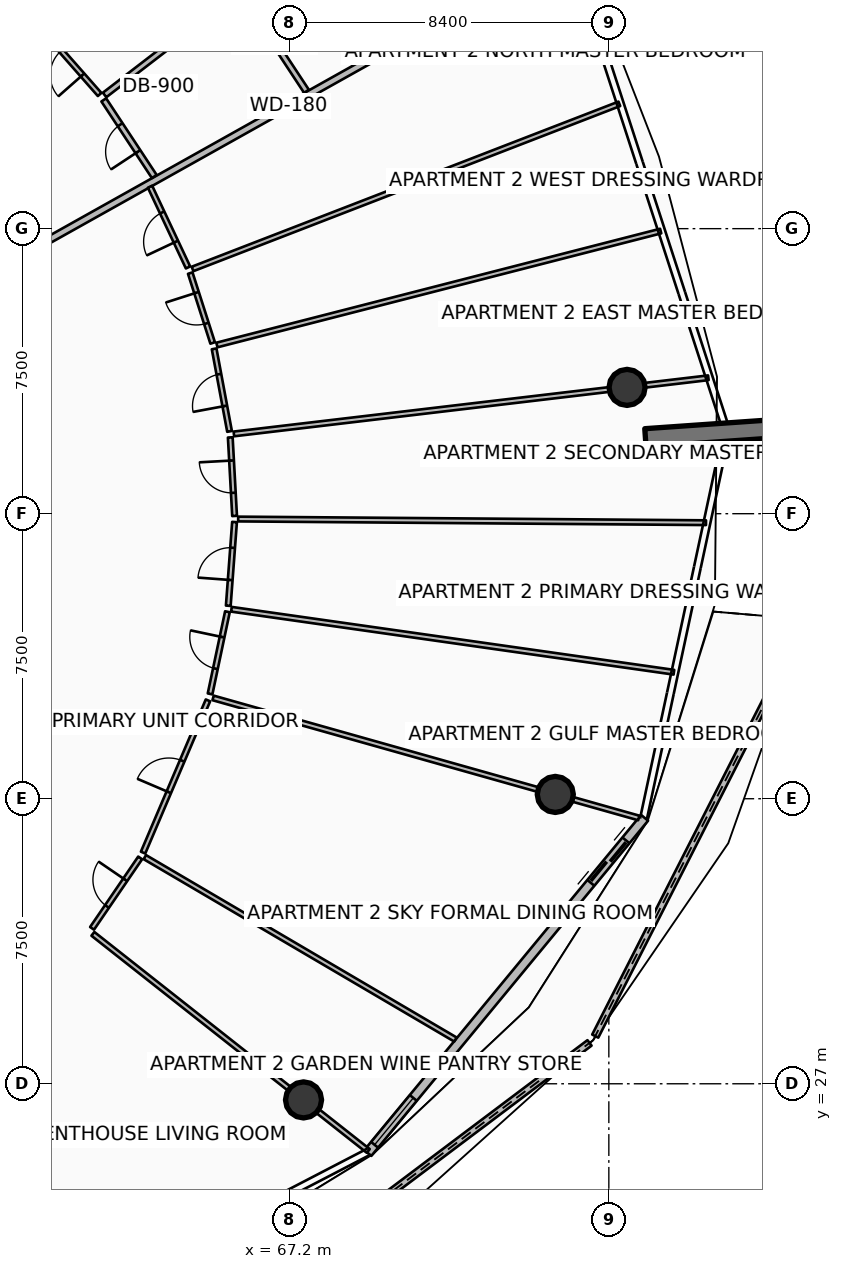
"""IFC4 building model, lengths in metres.
Left out: names, types, materials, properties, quantities, classifications, styles, units other than length and angle.
Written with IfcOpenShell. Run it as: python <this file> out.ifc"""

import sys

from ifc_helpers import new_model, si_unit, direction, frame, frame_2d, origin, origin_2d, place, context, subcontext, project, spatial, polyline, rectangle, circle, outline, extrude, element, fill, save


model = new_model("IFC4")
c1 = context("Model", 3, precision=1e-05, world=origin(), true_north=direction((0.0, 1.0)))
c2 = subcontext(c1, "Body", "Model", "MODEL_VIEW")
j1 = project(units=[si_unit("LENGTHUNIT", "METRE"), si_unit("PLANEANGLEUNIT", "RADIAN")], contexts=[c1])
p1 = place(None, origin())
s1 = spatial("IfcSite", under=j1, at=p1, CompositionType="ELEMENT")
p2 = place(p1, origin())
s2 = spatial("IfcBuilding", under=s1, at=p2, CompositionType="ELEMENT")
p3 = place(p2, frame((0.0, 0.0, 240.55)))
s3 = spatial("IfcBuildingStorey", under=s2, at=p3, CompositionType="ELEMENT", Elevation=240.55)
p4 = place(p3, frame((76.562, 43.997, 0.0), z_axis=(0.0, 0.0, 1.0), x_axis=(0.997563824095, 0.069759707979, 0.0)))
e1 = element("IfcWall", 1, at=p4, inside=s3, PredefinedType="SOLIDWALL", context=c2, shape_type="SweptSolid", body=[
    extrude(rectangle(XDim=3.5, YDim=0.48, at=frame_2d((1.75, 0.0))), origin(), (0.0, 0.0, 1.0), 3.85),
])
for number, where, z_axis, x_axis in (
    (2, (67.566, 26.575, 0.0), (0.0, 0.0, 1.0), (1.0, 0.0, 0.0)),
    (3, (74.191, 34.613, 0.0), (0.0, 0.0, 1.0), (1.0, 0.0, 0.0)),
    (4, (76.08, 45.323, 0.0), (0.0, 0.0, 1.0), (1.0, 0.0, 0.0)),
):
    element("IfcColumn", number, at=place(p3, frame(where, z_axis=z_axis, x_axis=x_axis)), inside=s3, PredefinedType="COLUMN", context=c2, shape_type="SweptSolid", body=[
        extrude(circle(Radius=0.475, at=origin_2d()), origin(), (0.0, 0.0, 1.0), 3.59),
    ])
p5 = place(p3, frame((65.972, 21.216, 0.0), z_axis=(0.0, 0.0, 1.0), x_axis=(0.799146815098, 0.601135898046, 0.0)))
e5 = element("IfcWall", 5, at=p5, inside=s3, PredefinedType="PARAPET", context=c2, shape_type="SweptSolid", body=[
    extrude(outline(polyline([(0.0, 0.0), (11.411, 0.0), (11.411, 1.348), (5.706, 1.182), (0.0, 1.12), (0.0, 0.0)])), frame((0.0, 0.09, 0.0), z_axis=(0.0, -1.0, 0.0), x_axis=(1.0, 0.0, 0.0)), (0.0, 0.0, 1.0), 0.18),
])
p6 = place(p3, frame((75.242, 28.254, 0.0), z_axis=(0.0, 0.0, 1.0), x_axis=(0.45375182612, 0.891128094211, 0.0)))
e6 = element("IfcWall", 6, at=p6, inside=s3, PredefinedType="PARAPET", context=c2, shape_type="SweptSolid", body=[
    extrude(outline(polyline([(0.0, 0.0), (12.3, 0.0), (12.3, 1.747), (6.15, 1.562), (0.0, 1.348), (0.0, 0.0)])), frame((0.0, 0.09, 0.0), z_axis=(0.0, -1.0, 0.0), x_axis=(1.0, 0.0, 0.0)), (0.0, 0.0, 1.0), 0.18),
])
p7 = place(p3, frame((69.258, 25.178, 0.0), z_axis=(0.0, 0.0, 1.0), x_axis=(0.636680093065, 0.771128043255, 0.0)))
e7 = element("IfcWall", 7, at=p7, inside=s3, PredefinedType="SOLIDWALL", context=c2, shape_type="SweptSolid", body=[
    extrude(rectangle(XDim=11.438, YDim=0.24, at=frame_2d((5.719, 0.0))), origin(), (0.0, 0.0, 1.0), 2.54),
])
p8 = place(p7, frame((9.218, 0.0, 0.0)))
e8 = element("IfcOpeningElement", 8, at=p8, cuts=e7, PredefinedType="OPENING", context=c2, shape_type="SweptSolid", body=[
    extrude(rectangle(XDim=1.45, YDim=2.15, at=frame_2d((0.725, 1.075))), frame((0.0, 0.13, 0.0), z_axis=(0.0, -1.0, 0.0), x_axis=(1.0, 0.0, 0.0)), (0.0, 0.0, 1.0), 0.26),
])
p9 = place(p7, frame((0.28, 0.0, 0.65)))
e9 = element("IfcOpeningElement", 9, at=p9, cuts=e7, PredefinedType="OPENING", context=c2, shape_type="SweptSolid", body=[
    extrude(rectangle(XDim=1.6, YDim=1.5, at=frame_2d((0.8, 0.75))), frame((0.0, 0.13, 0.0), z_axis=(0.0, -1.0, 0.0), x_axis=(1.0, 0.0, 0.0)), (0.0, 0.0, 1.0), 0.26),
])
p10 = place(p3, frame((59.796, 48.606, 0.0), z_axis=(0.0, 0.0, 1.0), x_axis=(0.872493213488, 0.488626229767, 0.0)))
e10 = element("IfcWall", 10, at=p10, inside=s3, PredefinedType="PARTITIONING", context=c2, shape_type="SweptSolid", body=[
    extrude(rectangle(XDim=16.91, YDim=0.18, at=frame_2d((8.455, 0.0))), origin(), (0.0, 0.0, 1.0), 2.957),
])
p11 = place(p3, frame((63.639, 50.872, 0.0), z_axis=(0.0, 0.0, 1.0), x_axis=(-0.550539267926, 0.834809268319, 0.0)))
e11 = element("IfcWall", 11, at=p11, inside=s3, PredefinedType="PARTITIONING", context=c2, shape_type="SweptSolid", body=[
    extrude(rectangle(XDim=2.414, YDim=0.15, at=frame_2d((1.207, 0.0))), origin(), (0.0, 0.0, 1.0), 2.957),
])
p12 = place(p11, frame((0.782, 0.0, 0.0)))
e12 = element("IfcOpeningElement", 12, at=p12, cuts=e11, PredefinedType="OPENING", context=c2, shape_type="SweptSolid", body=[
    extrude(rectangle(XDim=0.85, YDim=2.06, at=frame_2d((0.425, 1.03))), frame((0.0, 0.085, 0.0), z_axis=(0.0, -1.0, 0.0), x_axis=(1.0, 0.0, 0.0)), (0.0, 0.0, 1.0), 0.17),
])
p13 = place(p3, frame((67.643, 53.115, 0.0), z_axis=(0.0, 0.0, 1.0), x_axis=(-0.550484224605, 0.834845565635, 0.0)))
e13 = element("IfcWall", 13, at=p13, inside=s3, PredefinedType="PARTITIONING", context=c2, shape_type="SweptSolid", body=[
    extrude(rectangle(XDim=3.079, YDim=0.15, at=frame_2d((1.54, 0.0))), origin(), (0.0, 0.0, 1.0), 2.957),
])
p14 = place(p3, frame((62.331, 53.018, 0.0), z_axis=(0.0, 0.0, 1.0), x_axis=(0.792803030826, 0.609477935871, 0.0)))
e14 = element("IfcWall", 14, at=p14, inside=s3, PredefinedType="PARTITIONING", context=c2, shape_type="SweptSolid", body=[
    extrude(rectangle(XDim=4.46, YDim=0.15, at=frame_2d((2.23, 0.0))), origin(), (0.0, 0.0, 1.0), 3.03),
])
p15 = place(p3, frame((62.2, 53.031, 0.0), z_axis=(0.0, 0.0, 1.0), x_axis=(-0.660650282497, 0.750693815238, 0.0)))
e15 = element("IfcWall", 15, at=p15, inside=s3, PredefinedType="PARTITIONING", context=c2, shape_type="SweptSolid", body=[
    extrude(rectangle(XDim=2.212, YDim=0.125, at=frame_2d((1.106, 0.0))), origin(), (0.0, 0.0, 1.0), 3.03),
])
p16 = place(p15, frame((0.681, 0.0, 0.0)))
e16 = element("IfcOpeningElement", 16, at=p16, cuts=e15, PredefinedType="OPENING", context=c2, shape_type="SweptSolid", body=[
    extrude(rectangle(XDim=0.85, YDim=2.06, at=frame_2d((0.425, 1.03))), frame((0.0, 0.073, 0.0), z_axis=(0.0, -1.0, 0.0), x_axis=(1.0, 0.0, 0.0)), (0.0, 0.0, 1.0), 0.145),
])
p17 = place(p3, frame((62.023, 30.945, 0.0), z_axis=(0.0, 0.0, 1.0), x_axis=(0.785322102606, -0.619087388952, 0.0)))
e17 = element("IfcWall", 17, at=p17, inside=s3, PredefinedType="PARTITIONING", context=c2, shape_type="SweptSolid", body=[
    extrude(rectangle(XDim=9.228, YDim=0.125, at=frame_2d((4.614, 0.0))), origin(), (0.0, 0.0, 1.0), 2.957),
])
p18 = place(p3, frame((63.39, 32.963, 0.0), z_axis=(0.0, 0.0, 1.0), x_axis=(0.862331921897, -0.506343417532, 0.0)))
e18 = element("IfcWall", 18, at=p18, inside=s3, PredefinedType="PARTITIONING", context=c2, shape_type="SweptSolid", body=[
    extrude(rectangle(XDim=9.478, YDim=0.125, at=frame_2d((4.739, 0.0))), origin(), (0.0, 0.0, 1.0), 3.03),
])
p19 = place(p3, frame((62.001, 31.089, 0.0), z_axis=(0.0, 0.0, 1.0), x_axis=(0.564052095913, 0.825739204044, 0.0)))
e19 = element("IfcWall", 19, at=p19, inside=s3, PredefinedType="PARTITIONING", context=c2, shape_type="SweptSolid", body=[
    extrude(rectangle(XDim=2.245, YDim=0.125, at=frame_2d((1.122, 0.0))), origin(), (0.0, 0.0, 1.0), 2.957),
])
p20 = place(p19, frame((0.698, 0.0, 0.0)))
e20 = element("IfcOpeningElement", 20, at=p20, cuts=e19, PredefinedType="OPENING", context=c2, shape_type="SweptSolid", body=[
    extrude(rectangle(XDim=0.85, YDim=2.06, at=frame_2d((0.425, 1.03))), frame((0.0, 0.073, 0.0), z_axis=(0.0, -1.0, 0.0), x_axis=(1.0, 0.0, 0.0)), (0.0, 0.0, 1.0), 0.145),
])
p21 = place(p3, frame((63.344, 33.083, 0.0), z_axis=(0.0, 0.0, 1.0), x_axis=(0.392064212371, 0.919937852998, 0.0)))
e21 = element("IfcWall", 21, at=p21, inside=s3, PredefinedType="PARTITIONING", context=c2, shape_type="SweptSolid", body=[
    extrude(rectangle(XDim=4.354, YDim=0.125, at=frame_2d((2.177, 0.0))), origin(), (0.0, 0.0, 1.0), 2.957),
])
p22 = place(p21, frame((1.727, 0.0, 0.0)))
e22 = element("IfcOpeningElement", 22, at=p22, cuts=e21, PredefinedType="OPENING", context=c2, shape_type="SweptSolid", body=[
    extrude(rectangle(XDim=0.9, YDim=2.08, at=frame_2d((0.45, 1.04))), frame((0.0, 0.073, 0.0), z_axis=(0.0, -1.0, 0.0), x_axis=(1.0, 0.0, 0.0)), (0.0, 0.0, 1.0), 0.145),
])
p23 = place(p3, frame((65.187, 37.153, 0.0), z_axis=(0.0, 0.0, 1.0), x_axis=(0.962455577867, -0.271439239301, 0.0)))
e23 = element("IfcWall", 23, at=p23, inside=s3, PredefinedType="PARTITIONING", context=c2, shape_type="SweptSolid", body=[
    extrude(rectangle(XDim=11.639, YDim=0.125, at=frame_2d((5.819, 0.0))), origin(), (0.0, 0.0, 1.0), 2.957),
])
p24 = place(p3, frame((65.669, 39.485, 0.0), z_axis=(0.0, 0.0, 1.0), x_axis=(0.990022432034, -0.140909843761, 0.0)))
e24 = element("IfcWall", 24, at=p24, inside=s3, PredefinedType="PARTITIONING", context=c2, shape_type="SweptSolid", body=[
    extrude(rectangle(XDim=11.761, YDim=0.125, at=frame_2d((5.88, 0.0))), origin(), (0.0, 0.0, 1.0), 3.03),
])
p25 = place(p3, frame((65.846, 41.86, 0.0), z_axis=(0.0, 0.0, 1.0), x_axis=(0.999969162233, -0.007853316706, 0.0)))
e25 = element("IfcWall", 25, at=p25, inside=s3, PredefinedType="PARTITIONING", context=c2, shape_type="SweptSolid", body=[
    extrude(rectangle(XDim=12.311, YDim=0.125, at=frame_2d((6.155, 0.0))), origin(), (0.0, 0.0, 1.0), 3.03),
])
p26 = place(p3, frame((65.107, 37.258, 0.0), z_axis=(0.0, 0.0, 1.0), x_axis=(0.20677346991, 0.978388845062, 0.0)))
e26 = element("IfcWall", 26, at=p26, inside=s3, PredefinedType="PARTITIONING", context=c2, shape_type="SweptSolid", body=[
    extrude(rectangle(XDim=2.209, YDim=0.125, at=frame_2d((1.104, 0.0))), origin(), (0.0, 0.0, 1.0), 2.957),
])
p27 = place(p26, frame((0.68, 0.0, 0.0)))
e27 = element("IfcOpeningElement", 27, at=p27, cuts=e26, PredefinedType="OPENING", context=c2, shape_type="SweptSolid", body=[
    extrude(rectangle(XDim=0.85, YDim=2.06, at=frame_2d((0.425, 1.03))), frame((0.0, 0.073, 0.0), z_axis=(0.0, -1.0, 0.0), x_axis=(1.0, 0.0, 0.0)), (0.0, 0.0, 1.0), 0.145),
])
p28 = place(p3, frame((65.586, 39.578, 0.0), z_axis=(0.0, 0.0, 1.0), x_axis=(0.074490462528, 0.997221726093, 0.0)))
e28 = element("IfcWall", 28, at=p28, inside=s3, PredefinedType="PARTITIONING", context=c2, shape_type="SweptSolid", body=[
    extrude(rectangle(XDim=2.209, YDim=0.125, at=frame_2d((1.104, 0.0))), origin(), (0.0, 0.0, 1.0), 3.03),
])
p29 = place(p28, frame((0.679, 0.0, 0.0)))
e29 = element("IfcOpeningElement", 29, at=p29, cuts=e28, PredefinedType="OPENING", context=c2, shape_type="SweptSolid", body=[
    extrude(rectangle(XDim=0.85, YDim=2.06, at=frame_2d((0.425, 1.03))), frame((0.0, 0.073, 0.0), z_axis=(0.0, -1.0, 0.0), x_axis=(1.0, 0.0, 0.0)), (0.0, 0.0, 1.0), 0.145),
])
p30 = place(p3, frame((65.752, 41.94, 0.0), z_axis=(0.0, 0.0, 1.0), x_axis=(-0.055084577693, 0.998481692021, 0.0)))
e30 = element("IfcWall", 30, at=p30, inside=s3, PredefinedType="PARTITIONING", context=c2, shape_type="SweptSolid", body=[
    extrude(rectangle(XDim=2.07, YDim=0.125, at=frame_2d((1.035, 0.0))), origin(), (0.0, 0.0, 1.0), 2.957),
])
p31 = place(p30, frame((0.61, 0.0, 0.0)))
e31 = element("IfcOpeningElement", 31, at=p31, cuts=e30, PredefinedType="OPENING", context=c2, shape_type="SweptSolid", body=[
    extrude(rectangle(XDim=0.85, YDim=2.06, at=frame_2d((0.425, 1.03))), frame((0.0, 0.073, 0.0), z_axis=(0.0, -1.0, 0.0), x_axis=(1.0, 0.0, 0.0)), (0.0, 0.0, 1.0), 0.145),
])
p32 = place(p3, frame((65.733, 44.099, 0.0), z_axis=(0.0, 0.0, 1.0), x_axis=(0.99306831242, 0.117538618625, 0.0)))
e32 = element("IfcWall", 32, at=p32, inside=s3, PredefinedType="PARTITIONING", context=c2, shape_type="SweptSolid", body=[
    extrude(rectangle(XDim=12.573, YDim=0.125, at=frame_2d((6.286, 0.0))), origin(), (0.0, 0.0, 1.0), 2.957),
])
p33 = place(p3, frame((65.286, 46.438, 0.0), z_axis=(0.0, 0.0, 1.0), x_axis=(0.968583991447, 0.248686653265, 0.0)))
e33 = element("IfcWall", 33, at=p33, inside=s3, PredefinedType="PARTITIONING", context=c2, shape_type="SweptSolid", body=[
    extrude(rectangle(XDim=12.056, YDim=0.125, at=frame_2d((6.028, 0.0))), origin(), (0.0, 0.0, 1.0), 3.03),
])
p34 = place(p3, frame((64.645, 48.439, 0.0), z_axis=(0.0, 0.0, 1.0), x_axis=(0.93263897003, 0.360810963778, 0.0)))
e34 = element("IfcWall", 34, at=p34, inside=s3, PredefinedType="PARTITIONING", context=c2, shape_type="SweptSolid", body=[
    extrude(rectangle(XDim=12.043, YDim=0.125, at=frame_2d((6.021, 0.0))), origin(), (0.0, 0.0, 1.0), 3.03),
])
p35 = place(p3, frame((65.619, 44.166, 0.0), z_axis=(0.0, 0.0, 1.0), x_axis=(-0.183454395516, 0.983028221755, 0.0)))
e35 = element("IfcWall", 35, at=p35, inside=s3, PredefinedType="PARTITIONING", context=c2, shape_type="SweptSolid", body=[
    extrude(rectangle(XDim=2.209, YDim=0.125, at=frame_2d((1.104, 0.0))), origin(), (0.0, 0.0, 1.0), 2.957),
])
p36 = place(p35, frame((0.68, 0.0, 0.0)))
e36 = element("IfcOpeningElement", 36, at=p36, cuts=e35, PredefinedType="OPENING", context=c2, shape_type="SweptSolid", body=[
    extrude(rectangle(XDim=0.85, YDim=2.06, at=frame_2d((0.425, 1.03))), frame((0.0, 0.073, 0.0), z_axis=(0.0, -1.0, 0.0), x_axis=(1.0, 0.0, 0.0)), (0.0, 0.0, 1.0), 0.145),
])
p37 = place(p3, frame((65.175, 46.492, 0.0), z_axis=(0.0, 0.0, 1.0), x_axis=(-0.305358332679, 0.952237516938, 0.0)))
e37 = element("IfcWall", 37, at=p37, inside=s3, PredefinedType="PARTITIONING", context=c2, shape_type="SweptSolid", body=[
    extrude(rectangle(XDim=1.931, YDim=0.125, at=frame_2d((0.965, 0.0))), origin(), (0.0, 0.0, 1.0), 3.03),
])
p38 = place(p37, frame((0.54, 0.0, 0.0)))
e38 = element("IfcOpeningElement", 38, at=p38, cuts=e37, PredefinedType="OPENING", context=c2, shape_type="SweptSolid", body=[
    extrude(rectangle(XDim=0.85, YDim=2.06, at=frame_2d((0.425, 1.03))), frame((0.0, 0.073, 0.0), z_axis=(0.0, -1.0, 0.0), x_axis=(1.0, 0.0, 0.0)), (0.0, 0.0, 1.0), 0.145),
])
p39 = place(p3, frame((64.527, 48.479, 0.0), z_axis=(0.0, 0.0, 1.0), x_axis=(-0.425751972865, 0.904839907167, 0.0)))
e39 = element("IfcWall", 39, at=p39, inside=s3, PredefinedType="PARTITIONING", context=c2, shape_type="SweptSolid", body=[
    extrude(rectangle(XDim=2.348, YDim=0.125, at=frame_2d((1.174, 0.0))), origin(), (0.0, 0.0, 1.0), 2.957),
])
p40 = place(p39, frame((0.749, 0.0, 0.0)))
e40 = element("IfcOpeningElement", 40, at=p40, cuts=e39, PredefinedType="OPENING", context=c2, shape_type="SweptSolid", body=[
    extrude(rectangle(XDim=0.85, YDim=2.06, at=frame_2d((0.425, 1.03))), frame((0.0, 0.073, 0.0), z_axis=(0.0, -1.0, 0.0), x_axis=(1.0, 0.0, 0.0)), (0.0, 0.0, 1.0), 0.145),
])
p41 = place(p8, origin())
e41 = element("IfcDoor", 41, at=p41, inside=s3, OperationType="DOUBLE_DOOR_SLIDING", PredefinedType="DOOR", context=c2, shape_type="SweptSolid", body=[
    extrude(rectangle(XDim=1.45, YDim=2.15, at=frame_2d((0.725, 1.075))), frame((0.0, 0.025, 0.0), z_axis=(0.0, -1.0, 0.0), x_axis=(1.0, 0.0, 0.0)), (0.0, 0.0, 1.0), 0.05),
])
fill(e8, e41)
p42 = place(p9, origin())
e42 = element("IfcWindow", 42, at=p42, inside=s3, PartitioningType="SINGLE_PANEL", PredefinedType="WINDOW", context=c2, shape_type="SweptSolid", body=[
    extrude(rectangle(XDim=1.6, YDim=1.5, at=frame_2d((0.8, 0.75))), frame((0.0, 0.03, 0.0), z_axis=(0.0, -1.0, 0.0), x_axis=(1.0, 0.0, 0.0)), (0.0, 0.0, 1.0), 0.06),
])
fill(e9, e42)
p43 = place(p12, origin())
e43 = element("IfcDoor", 43, at=p43, inside=s3, OperationType="SINGLE_SWING_LEFT", PredefinedType="DOOR", context=c2, shape_type="SweptSolid", body=[
    extrude(rectangle(XDim=0.85, YDim=2.06, at=frame_2d((0.425, 1.03))), frame((0.0, 0.025, 0.0), z_axis=(0.0, -1.0, 0.0), x_axis=(1.0, 0.0, 0.0)), (0.0, 0.0, 1.0), 0.05),
])
fill(e12, e43)
p44 = place(p16, origin())
e44 = element("IfcDoor", 44, at=p44, inside=s3, OperationType="SINGLE_SWING_LEFT", PredefinedType="DOOR", context=c2, shape_type="SweptSolid", body=[
    extrude(rectangle(XDim=0.85, YDim=2.06, at=frame_2d((0.425, 1.03))), frame((0.0, 0.025, 0.0), z_axis=(0.0, -1.0, 0.0), x_axis=(1.0, 0.0, 0.0)), (0.0, 0.0, 1.0), 0.05),
])
fill(e16, e44)
p45 = place(p20, origin())
e45 = element("IfcDoor", 45, at=p45, inside=s3, OperationType="SINGLE_SWING_RIGHT", PredefinedType="DOOR", context=c2, shape_type="SweptSolid", body=[
    extrude(rectangle(XDim=0.85, YDim=2.06, at=frame_2d((0.425, 1.03))), frame((0.0, 0.025, 0.0), z_axis=(0.0, -1.0, 0.0), x_axis=(1.0, 0.0, 0.0)), (0.0, 0.0, 1.0), 0.05),
])
fill(e20, e45)
p46 = place(p22, origin())
e46 = element("IfcDoor", 46, at=p46, inside=s3, OperationType="SINGLE_SWING_LEFT", PredefinedType="DOOR", context=c2, shape_type="SweptSolid", body=[
    extrude(rectangle(XDim=0.9, YDim=2.08, at=frame_2d((0.45, 1.04))), frame((0.0, 0.025, 0.0), z_axis=(0.0, -1.0, 0.0), x_axis=(1.0, 0.0, 0.0)), (0.0, 0.0, 1.0), 0.05),
])
fill(e22, e46)
p47 = place(p27, origin())
e47 = element("IfcDoor", 47, at=p47, inside=s3, OperationType="SINGLE_SWING_RIGHT", PredefinedType="DOOR", context=c2, shape_type="SweptSolid", body=[
    extrude(rectangle(XDim=0.85, YDim=2.06, at=frame_2d((0.425, 1.03))), frame((0.0, 0.025, 0.0), z_axis=(0.0, -1.0, 0.0), x_axis=(1.0, 0.0, 0.0)), (0.0, 0.0, 1.0), 0.05),
])
fill(e27, e47)
p48 = place(p29, origin())
e48 = element("IfcDoor", 48, at=p48, inside=s3, OperationType="SINGLE_SWING_LEFT", PredefinedType="DOOR", context=c2, shape_type="SweptSolid", body=[
    extrude(rectangle(XDim=0.85, YDim=2.06, at=frame_2d((0.425, 1.03))), frame((0.0, 0.025, 0.0), z_axis=(0.0, -1.0, 0.0), x_axis=(1.0, 0.0, 0.0)), (0.0, 0.0, 1.0), 0.05),
])
fill(e29, e48)
p49 = place(p31, origin())
e49 = element("IfcDoor", 49, at=p49, inside=s3, OperationType="SINGLE_SWING_RIGHT", PredefinedType="DOOR", context=c2, shape_type="SweptSolid", body=[
    extrude(rectangle(XDim=0.85, YDim=2.06, at=frame_2d((0.425, 1.03))), frame((0.0, 0.025, 0.0), z_axis=(0.0, -1.0, 0.0), x_axis=(1.0, 0.0, 0.0)), (0.0, 0.0, 1.0), 0.05),
])
fill(e31, e49)
p50 = place(p36, origin())
e50 = element("IfcDoor", 50, at=p50, inside=s3, OperationType="SINGLE_SWING_LEFT", PredefinedType="DOOR", context=c2, shape_type="SweptSolid", body=[
    extrude(rectangle(XDim=0.85, YDim=2.06, at=frame_2d((0.425, 1.03))), frame((0.0, 0.025, 0.0), z_axis=(0.0, -1.0, 0.0), x_axis=(1.0, 0.0, 0.0)), (0.0, 0.0, 1.0), 0.05),
])
fill(e36, e50)
p51 = place(p38, origin())
e51 = element("IfcDoor", 51, at=p51, inside=s3, OperationType="SINGLE_SWING_RIGHT", PredefinedType="DOOR", context=c2, shape_type="SweptSolid", body=[
    extrude(rectangle(XDim=0.85, YDim=2.06, at=frame_2d((0.425, 1.03))), frame((0.0, 0.025, 0.0), z_axis=(0.0, -1.0, 0.0), x_axis=(1.0, 0.0, 0.0)), (0.0, 0.0, 1.0), 0.05),
])
fill(e38, e51)
p52 = place(p40, origin())
e52 = element("IfcDoor", 52, at=p52, inside=s3, OperationType="SINGLE_SWING_LEFT", PredefinedType="DOOR", context=c2, shape_type="SweptSolid", body=[
    extrude(rectangle(XDim=0.85, YDim=2.06, at=frame_2d((0.425, 1.03))), frame((0.0, 0.025, 0.0), z_axis=(0.0, -1.0, 0.0), x_axis=(1.0, 0.0, 0.0)), (0.0, 0.0, 1.0), 0.05),
])
fill(e40, e52)
save(model, sys.argv[1])
